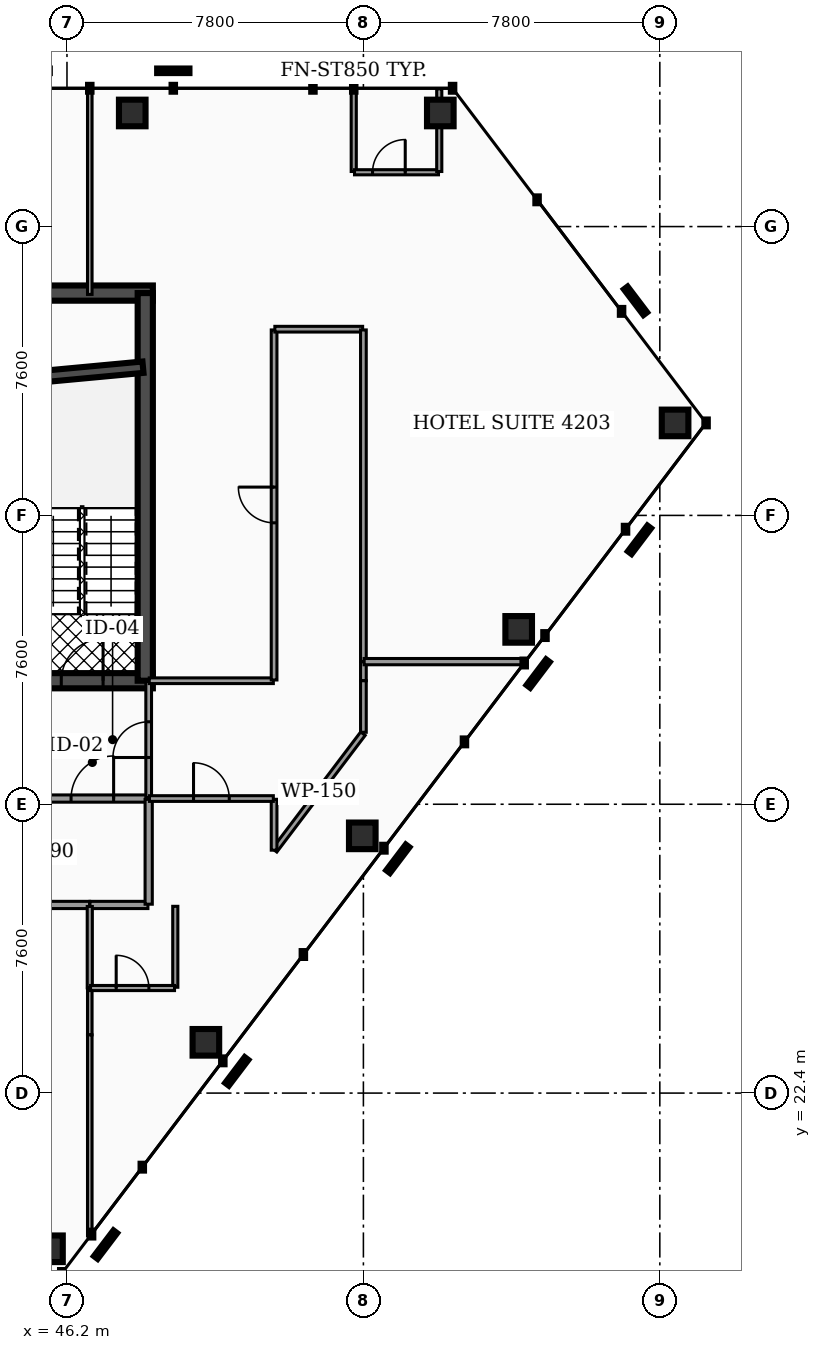
"""IFC4 building model, lengths in metres.
Left out: names, types, materials, properties, quantities, classifications, styles, units other than length and angle.
Written with IfcOpenShell. Run it as: python <this file> out.ifc"""

import sys

from ifc_helpers import new_model, si_unit, direction, frame, frame_2d, origin, origin_2d, place, context, subcontext, project, spatial, rectangle, hollow_rectangle, extrude, element, fill, save


model = new_model("IFC4")
c1 = context("Model", 3, precision=1e-05, world=origin(), true_north=direction((0.0, 1.0)))
c2 = subcontext(c1, "Body", "Model", "MODEL_VIEW")
j1 = project(units=[si_unit("LENGTHUNIT", "METRE"), si_unit("PLANEANGLEUNIT", "RADIAN")], contexts=[c1])
p1 = place(None, origin())
s1 = spatial("IfcSite", under=j1, at=p1, CompositionType="ELEMENT")
p2 = place(p1, origin())
s2 = spatial("IfcBuilding", under=s1, at=p2, CompositionType="ELEMENT")
p3 = place(p2, frame((0.0, 0.0, 172.04)))
s3 = spatial("IfcBuildingStorey", under=s2, at=p3, CompositionType="ELEMENT", Elevation=172.04)
p4 = place(p3, frame((28.4, 43.45, 0.0), z_axis=(0.0, 0.0, 1.0), x_axis=(1.0, 0.0, 0.0)))
e1 = element("IfcWall", 1, at=p4, inside=s3, PredefinedType="SHEAR", context=c2, shape_type="SweptSolid", body=[
    extrude(rectangle(XDim=20.06, YDim=0.4, at=frame_2d((10.03, 0.0))), origin(), (0.0, 0.0, 1.0), 3.5),
])
p5 = place(p3, frame((28.4, 33.25, 0.0), z_axis=(0.0, 0.0, 1.0), x_axis=(1.0, 0.0, 0.0)))
e2 = element("IfcWall", 2, at=p5, inside=s3, PredefinedType="SHEAR", context=c2, shape_type="SweptSolid", body=[
    extrude(rectangle(XDim=20.06, YDim=0.4, at=frame_2d((10.03, 0.0))), origin(), (0.0, 0.0, 1.0), 3.5),
])
p6 = place(p5, frame((4.03, 0.0, 0.0)))
e3 = element("IfcOpeningElement", 3, at=p6, cuts=e2, PredefinedType="OPENING", context=c2, shape_type="SweptSolid", body=[
    extrude(rectangle(XDim=1.1, YDim=2.15, at=frame_2d((0.55, 1.075))), frame((0.0, 0.21, 0.0), z_axis=(0.0, -1.0, 0.0), x_axis=(1.0, 0.0, 0.0)), (0.0, 0.0, 1.0), 0.42),
])
p7 = place(p5, frame((14.87, 0.0, 0.0)))
e4 = element("IfcOpeningElement", 4, at=p7, cuts=e2, PredefinedType="OPENING", context=c2, shape_type="SweptSolid", body=[
    extrude(rectangle(XDim=1.1, YDim=2.15, at=frame_2d((0.55, 1.075))), frame((0.0, 0.21, 0.0), z_axis=(0.0, -1.0, 0.0), x_axis=(1.0, 0.0, 0.0)), (0.0, 0.0, 1.0), 0.42),
])
p8 = place(p5, frame((5.95, 0.0, 0.0)))
e5 = element("IfcOpeningElement", 5, at=p8, cuts=e2, PredefinedType="OPENING", context=c2, shape_type="SweptSolid", body=[
    extrude(rectangle(XDim=1.0, YDim=2.1, at=frame_2d((0.5, 1.05))), frame((0.0, 0.21, 0.0), z_axis=(0.0, -1.0, 0.0), x_axis=(1.0, 0.0, 0.0)), (0.0, 0.0, 1.0), 0.42),
])
p9 = place(p5, frame((7.65, 0.0, 0.0)))
e6 = element("IfcOpeningElement", 6, at=p9, cuts=e2, PredefinedType="OPENING", context=c2, shape_type="SweptSolid", body=[
    extrude(rectangle(XDim=1.0, YDim=2.1, at=frame_2d((0.5, 1.05))), frame((0.0, 0.21, 0.0), z_axis=(0.0, -1.0, 0.0), x_axis=(1.0, 0.0, 0.0)), (0.0, 0.0, 1.0), 0.42),
])
p10 = place(p5, frame((1.31, 0.0, 0.0)))
e7 = element("IfcOpeningElement", 7, at=p10, cuts=e2, PredefinedType="OPENING", context=c2, shape_type="SweptSolid", body=[
    extrude(rectangle(XDim=1.1, YDim=2.2, at=frame_2d((0.55, 1.1))), frame((0.0, 0.21, 0.0), z_axis=(0.0, -1.0, 0.0), x_axis=(1.0, 0.0, 0.0)), (0.0, 0.0, 1.0), 0.42),
])
p11 = place(p5, frame((9.44, 0.0, 0.0)))
e8 = element("IfcOpeningElement", 8, at=p11, cuts=e2, PredefinedType="OPENING", context=c2, shape_type="SweptSolid", body=[
    extrude(rectangle(XDim=1.12, YDim=2.05, at=frame_2d((0.56, 1.025))), frame((0.0, 0.21, 0.0), z_axis=(0.0, -1.0, 0.0), x_axis=(1.0, 0.0, 0.0)), (0.0, 0.0, 1.0), 0.42),
])
p12 = place(p5, frame((17.65, 0.0, 0.0)))
e9 = element("IfcOpeningElement", 9, at=p12, cuts=e2, PredefinedType="OPENING", context=c2, shape_type="SweptSolid", body=[
    extrude(rectangle(XDim=1.1, YDim=2.2, at=frame_2d((0.55, 1.1))), frame((0.0, 0.21, 0.0), z_axis=(0.0, -1.0, 0.0), x_axis=(1.0, 0.0, 0.0)), (0.0, 0.0, 1.0), 0.42),
])
p13 = place(p3, frame((48.26, 33.25, 0.0), z_axis=(0.0, 0.0, 1.0), x_axis=(0.0, 1.0, 0.0)))
e10 = element("IfcWall", 10, at=p13, inside=s3, PredefinedType="SHEAR", context=c2, shape_type="SweptSolid", body=[
    extrude(rectangle(XDim=10.2, YDim=0.4, at=frame_2d((5.1, 0.0))), origin(), (0.0, 0.0, 1.0), 3.5),
])
p14 = place(p3, frame((44.98, 41.2, 0.0), z_axis=(0.0, 0.0, 1.0), x_axis=(0.995686468965, 0.09278176286, 0.0)))
e11 = element("IfcWall", 11, at=p14, inside=s3, PredefinedType="SHEAR", context=c2, shape_type="SweptSolid", body=[
    extrude(rectangle(XDim=3.234, YDim=0.3, at=frame_2d((1.617, 0.0))), origin(), (0.0, 0.0, 1.0), 3.5),
])
p15 = place(p3, frame((56.024, 48.189, 0.0), z_axis=(0.116873652995, -0.03309573823, 0.992595195106), x_axis=(0.272461864027, 0.962166582589, 0.0)))
e12 = element("IfcColumn", 12, at=p15, inside=s3, PredefinedType="COLUMN", context=c2, shape_type="SweptSolid", body=[
    extrude(hollow_rectangle(XDim=0.7, YDim=0.7, WallThickness=0.035, at=origin_2d()), origin(), (0.0, 0.0, 1.0), 3.526),
])
p16 = place(p3, frame((47.917, 48.189, 0.0), z_axis=(0.05492268, -0.033273816274, 0.997936046234), x_axis=(0.51815756212, 0.855285180988, 0.0)))
e13 = element("IfcColumn", 13, at=p16, inside=s3, PredefinedType="COLUMN", context=c2, shape_type="SweptSolid", body=[
    extrude(hollow_rectangle(XDim=0.7, YDim=0.7, WallThickness=0.035, at=origin_2d()), origin(), (0.0, 0.0, 1.0), 3.507),
])
p17 = place(p3, frame((45.74, 18.303, 0.0), z_axis=(-0.086554034105, -0.027855672292, 0.995857650822), x_axis=(0.306355379337, -0.951917213602, 0.0)))
e14 = element("IfcColumn", 14, at=p17, inside=s3, PredefinedType="COLUMN", context=c2, shape_type="SweptSolid", body=[
    extrude(hollow_rectangle(XDim=0.7, YDim=0.7, WallThickness=0.035, at=origin_2d()), origin(), (0.0, 0.0, 1.0), 3.515),
])
p18 = place(p3, frame((49.855, 23.736, 0.0), z_axis=(-0.061614610876, 0.005082335134, 0.998087075157), x_axis=(-0.082206685953, -0.996615302303, 0.0)))
e15 = element("IfcColumn", 15, at=p18, inside=s3, PredefinedType="COLUMN", context=c2, shape_type="SweptSolid", body=[
    extrude(hollow_rectangle(XDim=0.7, YDim=0.7, WallThickness=0.035, at=origin_2d()), origin(), (0.0, 0.0, 1.0), 3.507),
])
p19 = place(p3, frame((53.971, 29.168, 0.0), z_axis=(-0.036709016381, 0.03817180451, 0.998596696097), x_axis=(-0.72078251354, -0.693161285831, 0.0)))
e16 = element("IfcColumn", 16, at=p19, inside=s3, PredefinedType="COLUMN", context=c2, shape_type="SweptSolid", body=[
    extrude(hollow_rectangle(XDim=0.7, YDim=0.7, WallThickness=0.035, at=origin_2d()), origin(), (0.0, 0.0, 1.0), 3.505),
])
p20 = place(p3, frame((58.086, 34.601, 0.0), z_axis=(-0.011618722717, 0.071103800099, 0.997401250698), x_axis=(-0.986910933571, -0.16126626801, 0.0)))
e17 = element("IfcColumn", 17, at=p20, inside=s3, PredefinedType="COLUMN", context=c2, shape_type="SweptSolid", body=[
    extrude(hollow_rectangle(XDim=0.7, YDim=0.7, WallThickness=0.035, at=origin_2d()), origin(), (0.0, 0.0, 1.0), 3.509),
])
p21 = place(p3, frame((62.202, 40.034, 0.0), z_axis=(0.013319345089, 0.103779897152, 0.994511099985), x_axis=(-0.99186450143, 0.127298117831, 0.0)))
e18 = element("IfcColumn", 18, at=p21, inside=s3, PredefinedType="COLUMN", context=c2, shape_type="SweptSolid", body=[
    extrude(hollow_rectangle(XDim=0.7, YDim=0.7, WallThickness=0.035, at=origin_2d()), origin(), (0.0, 0.0, 1.0), 3.519),
])
p22 = place(p3, frame((45.405, 30.15, 0.0), z_axis=(0.0, 0.0, 1.0), x_axis=(1.0, 0.0, 0.0)))
e19 = element("IfcWall", 19, at=p22, inside=s3, PredefinedType="PARTITIONING", context=c2, shape_type="SweptSolid", body=[
    extrude(rectangle(XDim=2.925, YDim=0.19, at=frame_2d((1.462, 0.0))), origin(), (0.0, 0.0, 1.0), 2.457),
])
p23 = place(p22, frame((0.903, 0.0, 0.0)))
e20 = element("IfcOpeningElement", 20, at=p23, cuts=e19, PredefinedType="OPENING", context=c2, shape_type="SweptSolid", body=[
    extrude(rectangle(XDim=1.12, YDim=2.05, at=frame_2d((0.56, 1.025))), frame((0.0, 0.105, 0.0), z_axis=(0.0, -1.0, 0.0), x_axis=(1.0, 0.0, 0.0)), (0.0, 0.0, 1.0), 0.21),
])
p24 = place(p3, frame((48.35, 30.17, 0.0), z_axis=(0.0, 0.0, 1.0), x_axis=(0.0, 1.0, 0.0)))
e21 = element("IfcWall", 21, at=p24, inside=s3, PredefinedType="PARTITIONING", context=c2, shape_type="SweptSolid", body=[
    extrude(rectangle(XDim=3.06, YDim=0.15, at=frame_2d((1.53, 0.0))), origin(), (0.0, 0.0, 1.0), 2.457),
])
p25 = place(p24, frame((1.06, 0.0, 0.0)))
e22 = element("IfcOpeningElement", 22, at=p25, cuts=e21, PredefinedType="OPENING", context=c2, shape_type="SweptSolid", body=[
    extrude(rectangle(XDim=0.94, YDim=2.05, at=frame_2d((0.47, 1.025))), frame((0.0, 0.085, 0.0), z_axis=(0.0, -1.0, 0.0), x_axis=(1.0, 0.0, 0.0)), (0.0, 0.0, 1.0), 0.17),
])
p26 = place(p3, frame((45.42, 27.35, 0.0), z_axis=(0.0, 0.0, 1.0), x_axis=(1.0, 0.0, 0.0)))
e23 = element("IfcWall", 23, at=p26, inside=s3, PredefinedType="PARTITIONING", context=c2, shape_type="SweptSolid", body=[
    extrude(rectangle(XDim=1.375, YDim=0.19, at=frame_2d((0.688, 0.0))), origin(), (0.0, 0.0, 1.0), 2.457),
])
p27 = place(p3, frame((46.805, 27.35, 0.0), z_axis=(0.0, 0.0, 1.0), x_axis=(1.0, 0.0, 0.0)))
e24 = element("IfcWall", 24, at=p27, inside=s3, PredefinedType="PARTITIONING", context=c2, shape_type="SweptSolid", body=[
    extrude(rectangle(XDim=1.525, YDim=0.19, at=frame_2d((0.763, 0.0))), origin(), (0.0, 0.0, 1.0), 2.457),
])
p28 = place(p3, frame((48.35, 27.37, 0.0), z_axis=(0.0, 0.0, 1.0), x_axis=(0.0, 1.0, 0.0)))
e25 = element("IfcWall", 25, at=p28, inside=s3, PredefinedType="PARTITIONING", context=c2, shape_type="SweptSolid", body=[
    extrude(rectangle(XDim=2.76, YDim=0.19, at=frame_2d((1.38, 0.0))), origin(), (0.0, 0.0, 1.0), 2.457),
])
p29 = place(p3, frame((54.0, 33.25, 0.0), z_axis=(0.0, 0.0, 1.0), x_axis=(0.0, 1.0, 0.0)))
e26 = element("IfcWall", 26, at=p29, inside=s3, PredefinedType="PARTITIONING", context=c2, shape_type="SweptSolid", body=[
    extrude(rectangle(XDim=0.498, YDim=0.15, at=frame_2d((0.249, 0.0))), origin(), (0.0, 0.0, 1.0), 2.457),
])
p30 = place(p3, frame((54.0, 31.894, 0.0), z_axis=(0.0, 0.0, 1.0), x_axis=(0.0, 1.0, 0.0)))
e27 = element("IfcWall", 27, at=p30, inside=s3, PredefinedType="PARTITIONING", context=c2, shape_type="SweptSolid", body=[
    extrude(rectangle(XDim=1.356, YDim=0.15, at=frame_2d((0.678, 0.0))), origin(), (0.0, 0.0, 1.0), 2.457),
])
p31 = place(p3, frame((51.662, 28.787, 0.0), z_axis=(0.0, 0.0, 1.0), x_axis=(0.603806431354, 0.797130976349, 0.0)))
e28 = element("IfcWall", 28, at=p31, inside=s3, PredefinedType="PARTITIONING", context=c2, shape_type="SweptSolid", body=[
    extrude(rectangle(XDim=3.852, YDim=0.15, at=frame_2d((1.926, 0.0))), origin(), (0.0, 0.0, 1.0), 2.457),
])
p32 = place(p3, frame((51.65, 28.792, 0.0), z_axis=(0.0, 0.0, 1.0), x_axis=(0.0, 1.0, 0.0)))
e29 = element("IfcWall", 29, at=p32, inside=s3, PredefinedType="PARTITIONING", context=c2, shape_type="SweptSolid", body=[
    extrude(rectangle(XDim=1.338, YDim=0.15, at=frame_2d((0.669, 0.0))), origin(), (0.0, 0.0, 1.0), 2.457),
])
p33 = place(p3, frame((48.37, 30.15, 0.0), z_axis=(0.0, 0.0, 1.0), x_axis=(1.0, 0.0, 0.0)))
e30 = element("IfcWall", 30, at=p33, inside=s3, PredefinedType="PARTITIONING", context=c2, shape_type="SweptSolid", body=[
    extrude(rectangle(XDim=3.26, YDim=0.15, at=frame_2d((1.63, 0.0))), origin(), (0.0, 0.0, 1.0), 2.457),
])
p34 = place(p33, frame((1.16, 0.0, 0.0)))
e31 = element("IfcOpeningElement", 31, at=p34, cuts=e30, PredefinedType="OPENING", context=c2, shape_type="SweptSolid", body=[
    extrude(rectangle(XDim=0.94, YDim=2.05, at=frame_2d((0.47, 1.025))), frame((0.0, 0.085, 0.0), z_axis=(0.0, -1.0, 0.0), x_axis=(1.0, 0.0, 0.0)), (0.0, 0.0, 1.0), 0.17),
])
p35 = place(p3, frame((48.365, 33.25, 0.0), z_axis=(0.0, 0.0, 1.0), x_axis=(1.0, 0.0, 0.0)))
e32 = element("IfcWall", 32, at=p35, inside=s3, PredefinedType="PARTITIONING", context=c2, shape_type="SweptSolid", body=[
    extrude(rectangle(XDim=3.265, YDim=0.15, at=frame_2d((1.632, 0.0))), origin(), (0.0, 0.0, 1.0), 2.457),
])
p36 = place(p3, frame((51.65, 33.27, 0.0), z_axis=(0.0, 0.0, 1.0), x_axis=(0.0, 1.0, 0.0)))
e33 = element("IfcWall", 33, at=p36, inside=s3, PredefinedType="PARTITIONING", context=c2, shape_type="SweptSolid", body=[
    extrude(rectangle(XDim=9.21, YDim=0.15, at=frame_2d((4.605, 0.0))), origin(), (0.0, 0.0, 1.0), 2.457),
])
p37 = place(p36, frame((4.135, 0.0, 0.0)))
e34 = element("IfcOpeningElement", 34, at=p37, cuts=e33, PredefinedType="OPENING", context=c2, shape_type="SweptSolid", body=[
    extrude(rectangle(XDim=0.94, YDim=2.05, at=frame_2d((0.47, 1.025))), frame((0.0, 0.085, 0.0), z_axis=(0.0, -1.0, 0.0), x_axis=(1.0, 0.0, 0.0)), (0.0, 0.0, 1.0), 0.17),
])
p38 = place(p3, frame((51.67, 42.5, 0.0), z_axis=(0.0, 0.0, 1.0), x_axis=(1.0, 0.0, 0.0)))
e35 = element("IfcWall", 35, at=p38, inside=s3, PredefinedType="PARTITIONING", context=c2, shape_type="SweptSolid", body=[
    extrude(rectangle(XDim=2.31, YDim=0.15, at=frame_2d((1.155, 0.0))), origin(), (0.0, 0.0, 1.0), 2.457),
])
p39 = place(p3, frame((54.0, 33.758, 0.0), z_axis=(0.0, 0.0, 1.0), x_axis=(0.0, 1.0, 0.0)))
e36 = element("IfcWall", 36, at=p39, inside=s3, PredefinedType="PARTITIONING", context=c2, shape_type="SweptSolid", body=[
    extrude(rectangle(XDim=8.722, YDim=0.15, at=frame_2d((4.361, 0.0))), origin(), (0.0, 0.0, 1.0), 2.457),
])
p40 = place(p3, frame((46.8, 23.932, 0.0), z_axis=(0.0, 0.0, 1.0), x_axis=(0.0, 1.0, 0.0)))
e37 = element("IfcWall", 37, at=p40, inside=s3, PredefinedType="PARTITIONING", context=c2, shape_type="SweptSolid", body=[
    extrude(rectangle(XDim=1.228, YDim=0.12, at=frame_2d((0.614, 0.0))), origin(), (0.0, 0.0, 1.0), 2.457),
])
p41 = place(p3, frame((46.8, 18.642, 0.0), z_axis=(0.0, 0.0, 1.0), x_axis=(0.0, 1.0, 0.0)))
e38 = element("IfcWall", 38, at=p41, inside=s3, PredefinedType="PARTITIONING", context=c2, shape_type="SweptSolid", body=[
    extrude(rectangle(XDim=5.29, YDim=0.12, at=frame_2d((2.645, 0.0))), origin(), (0.0, 0.0, 1.0), 2.457),
])
p42 = place(p3, frame((46.8, 25.169, 0.0), z_axis=(0.0, 0.0, 1.0), x_axis=(0.0, 1.0, 0.0)))
e39 = element("IfcWall", 39, at=p42, inside=s3, PredefinedType="PARTITIONING", context=c2, shape_type="SweptSolid", body=[
    extrude(rectangle(XDim=2.14, YDim=0.135, at=frame_2d((1.07, 0.0))), origin(), (0.0, 0.0, 1.0), 2.457),
])
p43 = place(p3, frame((46.8, 43.415, 0.0), z_axis=(0.0, 0.0, 1.0), x_axis=(0.0, 1.0, 0.0)))
e40 = element("IfcWall", 40, at=p43, inside=s3, PredefinedType="PARTITIONING", context=c2, shape_type="SweptSolid", body=[
    extrude(rectangle(XDim=5.409, YDim=0.12, at=frame_2d((2.705, 0.0))), origin(), (0.0, 0.0, 1.0), 2.457),
])
p44 = place(p3, frame((49.05, 25.184, 0.0), z_axis=(0.0, 0.0, 1.0), x_axis=(0.0, 1.0, 0.0)))
e41 = element("IfcWall", 41, at=p44, inside=s3, PredefinedType="PARTITIONING", context=c2, shape_type="SweptSolid", body=[
    extrude(rectangle(XDim=2.13, YDim=0.135, at=frame_2d((1.065, 0.0))), origin(), (0.0, 0.0, 1.0), 2.457),
])
p45 = place(p3, frame((46.82, 25.164, 0.0), z_axis=(0.0, 0.0, 1.0), x_axis=(1.0, 0.0, 0.0)))
e42 = element("IfcWall", 42, at=p45, inside=s3, PredefinedType="PARTITIONING", context=c2, shape_type="SweptSolid", body=[
    extrude(rectangle(XDim=2.21, YDim=0.135, at=frame_2d((1.105, 0.0))), origin(), (0.0, 0.0, 1.0), 2.457),
])
p46 = place(p45, frame((0.675, 0.0, 0.0)))
e43 = element("IfcOpeningElement", 43, at=p46, cuts=e42, PredefinedType="OPENING", context=c2, shape_type="SweptSolid", body=[
    extrude(rectangle(XDim=0.86, YDim=2.05, at=frame_2d((0.43, 1.025))), frame((0.0, 0.077, 0.0), z_axis=(0.0, -1.0, 0.0), x_axis=(1.0, 0.0, 0.0)), (0.0, 0.0, 1.0), 0.155),
])
p47 = place(p3, frame((54.02, 33.753, 0.0), z_axis=(0.0, 0.0, 1.0), x_axis=(1.0, 0.0, 0.0)))
e44 = element("IfcWall", 44, at=p47, inside=s3, PredefinedType="PARTITIONING", context=c2, shape_type="SweptSolid", body=[
    extrude(rectangle(XDim=4.224, YDim=0.165, at=frame_2d((2.112, 0.0))), origin(), (0.0, 0.0, 1.0), 2.457),
])
p48 = place(p3, frame((53.746, 46.649, 0.0), z_axis=(0.0, 0.0, 1.0), x_axis=(0.0, 1.0, 0.0)))
e45 = element("IfcWall", 45, at=p48, inside=s3, PredefinedType="PARTITIONING", context=c2, shape_type="SweptSolid", body=[
    extrude(rectangle(XDim=2.175, YDim=0.135, at=frame_2d((1.087, 0.0))), origin(), (0.0, 0.0, 1.0), 2.457),
])
p49 = place(p3, frame((53.766, 46.629, 0.0), z_axis=(0.0, 0.0, 1.0), x_axis=(1.0, 0.0, 0.0)))
e46 = element("IfcWall", 46, at=p49, inside=s3, PredefinedType="PARTITIONING", context=c2, shape_type="SweptSolid", body=[
    extrude(rectangle(XDim=2.21, YDim=0.135, at=frame_2d((1.105, 0.0))), origin(), (0.0, 0.0, 1.0), 2.457),
])
p50 = place(p49, frame((0.475, 0.0, 0.0)))
e47 = element("IfcOpeningElement", 47, at=p50, cuts=e46, PredefinedType="OPENING", context=c2, shape_type="SweptSolid", body=[
    extrude(rectangle(XDim=0.86, YDim=2.05, at=frame_2d((0.43, 1.025))), frame((0.0, 0.077, 0.0), z_axis=(0.0, -1.0, 0.0), x_axis=(1.0, 0.0, 0.0)), (0.0, 0.0, 1.0), 0.155),
])
p51 = place(p3, frame((55.996, 46.649, 0.0), z_axis=(0.0, 0.0, 1.0), x_axis=(0.0, 1.0, 0.0)))
e48 = element("IfcWall", 48, at=p51, inside=s3, PredefinedType="PARTITIONING", context=c2, shape_type="SweptSolid", body=[
    extrude(rectangle(XDim=2.175, YDim=0.135, at=frame_2d((1.087, 0.0))), origin(), (0.0, 0.0, 1.0), 2.457),
])
p52 = place(p12, origin())
e49 = element("IfcDoor", 49, at=p52, inside=s3, OperationType="SINGLE_SWING_RIGHT", PredefinedType="DOOR", context=c2, shape_type="SweptSolid", body=[
    extrude(rectangle(XDim=1.1, YDim=2.2, at=frame_2d((0.55, 1.1))), frame((0.0, 0.025, 0.0), z_axis=(0.0, -1.0, 0.0), x_axis=(1.0, 0.0, 0.0)), (0.0, 0.0, 1.0), 0.05),
])
fill(e9, e49)
p53 = place(p23, origin())
e50 = element("IfcDoor", 50, at=p53, inside=s3, OperationType="SINGLE_SWING_RIGHT", PredefinedType="DOOR", context=c2, shape_type="SweptSolid", body=[
    extrude(rectangle(XDim=1.12, YDim=2.05, at=frame_2d((0.56, 1.025))), frame((0.0, 0.025, 0.0), z_axis=(0.0, -1.0, 0.0), x_axis=(1.0, 0.0, 0.0)), (0.0, 0.0, 1.0), 0.05),
])
fill(e20, e50)
p54 = place(p25, origin())
e51 = element("IfcDoor", 51, at=p54, inside=s3, OperationType="SINGLE_SWING_LEFT", PredefinedType="DOOR", context=c2, shape_type="SweptSolid", body=[
    extrude(rectangle(XDim=0.94, YDim=2.05, at=frame_2d((0.47, 1.025))), frame((0.0, 0.025, 0.0), z_axis=(0.0, -1.0, 0.0), x_axis=(1.0, 0.0, 0.0)), (0.0, 0.0, 1.0), 0.05),
])
fill(e22, e51)
p55 = place(p34, origin())
e52 = element("IfcDoor", 52, at=p55, inside=s3, OperationType="SINGLE_SWING_LEFT", PredefinedType="DOOR", context=c2, shape_type="SweptSolid", body=[
    extrude(rectangle(XDim=0.94, YDim=2.05, at=frame_2d((0.47, 1.025))), frame((0.0, 0.025, 0.0), z_axis=(0.0, -1.0, 0.0), x_axis=(1.0, 0.0, 0.0)), (0.0, 0.0, 1.0), 0.05),
])
fill(e31, e52)
p56 = place(p37, origin())
e53 = element("IfcDoor", 53, at=p56, inside=s3, OperationType="SINGLE_SWING_RIGHT", PredefinedType="DOOR", context=c2, shape_type="SweptSolid", body=[
    extrude(rectangle(XDim=0.94, YDim=2.05, at=frame_2d((0.47, 1.025))), frame((0.0, 0.025, 0.0), z_axis=(0.0, -1.0, 0.0), x_axis=(1.0, 0.0, 0.0)), (0.0, 0.0, 1.0), 0.05),
])
fill(e34, e53)
p57 = place(p46, origin())
e54 = element("IfcDoor", 54, at=p57, inside=s3, OperationType="SINGLE_SWING_LEFT", PredefinedType="DOOR", context=c2, shape_type="SweptSolid", body=[
    extrude(rectangle(XDim=0.86, YDim=2.05, at=frame_2d((0.43, 1.025))), frame((0.0, 0.025, 0.0), z_axis=(0.0, -1.0, 0.0), x_axis=(1.0, 0.0, 0.0)), (0.0, 0.0, 1.0), 0.05),
])
fill(e43, e54)
p58 = place(p50, origin())
e55 = element("IfcDoor", 55, at=p58, inside=s3, OperationType="SINGLE_SWING_RIGHT", PredefinedType="DOOR", context=c2, shape_type="SweptSolid", body=[
    extrude(rectangle(XDim=0.86, YDim=2.05, at=frame_2d((0.43, 1.025))), frame((0.0, 0.025, 0.0), z_axis=(0.0, -1.0, 0.0), x_axis=(1.0, 0.0, 0.0)), (0.0, 0.0, 1.0), 0.05),
])
fill(e47, e55)
save(model, sys.argv[1])
